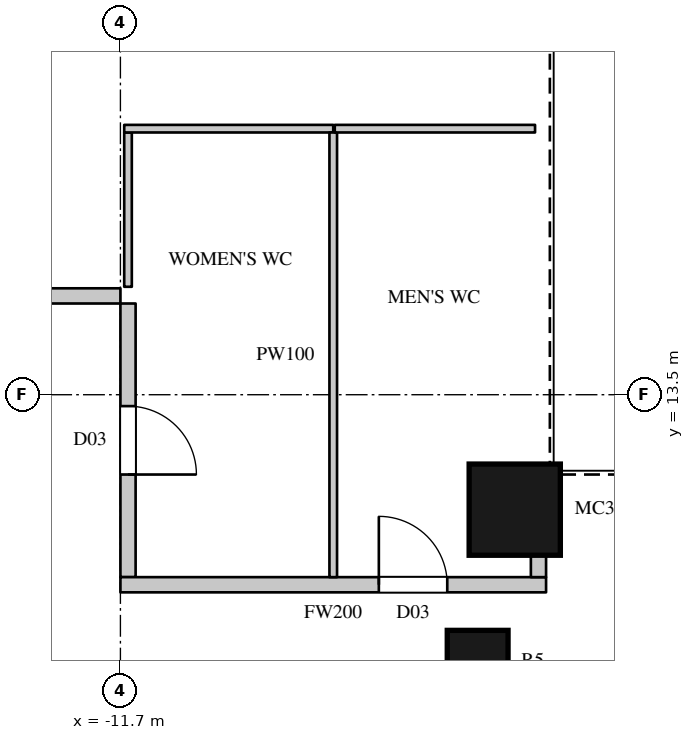
"""IFC4 building model, lengths in metres.
Left out: names, types, materials, properties, quantities, classifications, styles, units other than length and angle.
Written with IfcOpenShell. Run it as: python <this file> out.ifc"""

import sys

from ifc_helpers import new_model, si_unit, direction, frame, frame_2d, origin, origin_2d, place, context, subcontext, project, spatial, rectangle, circle, extrude, element, fill, save


model = new_model("IFC4")
c1 = context("Model", 3, precision=1e-05, world=origin(), true_north=direction((0.0, 1.0)))
c2 = subcontext(c1, "Body", "Model", "MODEL_VIEW")
j1 = project(units=[si_unit("LENGTHUNIT", "METRE"), si_unit("PLANEANGLEUNIT", "RADIAN")], contexts=[c1])
p1 = place(None, origin())
s1 = spatial("IfcSite", under=j1, at=p1, CompositionType="ELEMENT")
p2 = place(p1, origin())
s2 = spatial("IfcBuilding", under=s1, at=p2, CompositionType="ELEMENT")
p3 = place(p2, frame((0.0, 0.0, 329.5)))
s3 = spatial("IfcBuildingStorey", under=s2, at=p3, CompositionType="ELEMENT", Elevation=329.5)
p4 = place(p3, frame((-6.512, 11.988, 0.0), z_axis=(0.0, 0.0, 1.0), x_axis=(1.0, 0.0, 0.0)))
e1 = element("IfcColumn", 1, at=p4, inside=s3, PredefinedType="COLUMN", context=c2, shape_type="SweptSolid", body=[
    extrude(circle(Radius=0.6, at=origin_2d()), origin(), (0.0, 0.0, 1.0), 5.5),
])
p5 = place(p3, frame((-7.0, 10.0, 0.0), z_axis=(0.0, 0.0, 1.0), x_axis=(1.0, 0.0, 0.0)))
e2 = element("IfcColumn", 2, at=p5, inside=s3, PredefinedType="COLUMN", context=c2, shape_type="SweptSolid", body=[
    extrude(circle(Radius=0.4, at=origin_2d()), origin(), (0.0, 0.0, 1.0), 5.5),
])
p6 = place(p3, frame((-13.97, 14.8, 0.0), z_axis=(0.0, 0.0, 1.0), x_axis=(1.0, 0.0, 0.0)))
e3 = element("IfcWall", 3, at=p6, inside=s3, PredefinedType="PARTITIONING", context=c2, shape_type="SweptSolid", body=[
    extrude(rectangle(XDim=2.27, YDim=0.2, at=frame_2d((1.135, 0.0))), origin(), (0.0, 0.0, 1.0), 5.098),
])
p7 = place(p3, frame((-11.6, 11.1, 0.0), z_axis=(0.0, 0.0, 1.0), x_axis=(0.0, 1.0, 0.0)))
e4 = element("IfcWall", 4, at=p7, inside=s3, PredefinedType="PARTITIONING", context=c2, shape_type="SweptSolid", body=[
    extrude(rectangle(XDim=3.6, YDim=0.2, at=frame_2d((1.8, 0.0))), origin(), (0.0, 0.0, 1.0), 5.098),
])
p8 = place(p7, frame((1.35, 0.0, 0.0)))
e5 = element("IfcOpeningElement", 5, at=p8, cuts=e4, PredefinedType="OPENING", context=c2, shape_type="SweptSolid", body=[
    extrude(rectangle(XDim=0.9, YDim=2.2, at=frame_2d((0.45, 1.1))), frame((0.0, 0.11, 0.0), z_axis=(0.0, -1.0, 0.0), x_axis=(1.0, 0.0, 0.0)), (0.0, 0.0, 1.0), 0.22),
])
p9 = place(p3, frame((-11.7, 11.0, 0.0), z_axis=(0.0, 0.0, 1.0), x_axis=(1.0, 0.0, 0.0)))
e6 = element("IfcWall", 6, at=p9, inside=s3, PredefinedType="PARTITIONING", context=c2, shape_type="SweptSolid", body=[
    extrude(rectangle(XDim=5.6, YDim=0.2, at=frame_2d((2.8, 0.0))), origin(), (0.0, 0.0, 1.0), 5.098),
])
p10 = place(p9, frame((3.4, 0.0, 0.0)))
e7 = element("IfcOpeningElement", 7, at=p10, cuts=e6, PredefinedType="OPENING", context=c2, shape_type="SweptSolid", body=[
    extrude(rectangle(XDim=0.9, YDim=2.2, at=frame_2d((0.45, 1.1))), frame((0.0, 0.11, 0.0), z_axis=(0.0, -1.0, 0.0), x_axis=(1.0, 0.0, 0.0)), (0.0, 0.0, 1.0), 0.22),
])
p11 = place(p3, frame((-6.2, 11.1, 0.0), z_axis=(0.0, 0.0, 1.0), x_axis=(0.0, 1.0, 0.0)))
e8 = element("IfcWall", 8, at=p11, inside=s3, PredefinedType="PARTITIONING", context=c2, shape_type="SweptSolid", body=[
    extrude(rectangle(XDim=0.338, YDim=0.2, at=frame_2d((0.169, 0.0))), origin(), (0.0, 0.0, 1.0), 5.098),
])
p12 = place(p3, frame((-11.6, 14.92, 0.0), z_axis=(0.0, 0.0, 1.0), x_axis=(0.0, 1.0, 0.0)))
e9 = element("IfcWall", 9, at=p12, inside=s3, PredefinedType="PARTITIONING", context=c2, shape_type="SweptSolid", body=[
    extrude(rectangle(XDim=2.03, YDim=0.1, at=frame_2d((1.015, 0.0))), origin(), (0.0, 0.0, 1.0), 5.098),
])
p13 = place(p3, frame((-11.65, 17.0, 0.0), z_axis=(0.0, 0.0, 1.0), x_axis=(1.0, 0.0, 0.0)))
e10 = element("IfcWall", 10, at=p13, inside=s3, PredefinedType="PARTITIONING", context=c2, shape_type="SweptSolid", body=[
    extrude(rectangle(XDim=2.75, YDim=0.1, at=frame_2d((1.375, 0.0))), origin(), (0.0, 0.0, 1.0), 5.098),
])
p14 = place(p3, frame((-8.9, 11.1, 0.0), z_axis=(0.0, 0.0, 1.0), x_axis=(0.0, 1.0, 0.0)))
e11 = element("IfcWall", 11, at=p14, inside=s3, PredefinedType="PARTITIONING", context=c2, shape_type="SweptSolid", body=[
    extrude(rectangle(XDim=5.85, YDim=0.1, at=frame_2d((2.925, 0.0))), origin(), (0.0, 0.0, 1.0), 5.098),
])
p15 = place(p3, frame((-8.88, 17.0, 0.0), z_axis=(0.0, 0.0, 1.0), x_axis=(1.0, 0.0, 0.0)))
e12 = element("IfcWall", 12, at=p15, inside=s3, PredefinedType="PARTITIONING", context=c2, shape_type="SweptSolid", body=[
    extrude(rectangle(XDim=2.635, YDim=0.1, at=frame_2d((1.317, 0.0))), origin(), (0.0, 0.0, 1.0), 5.098),
])
p16 = place(p8, origin())
e13 = element("IfcDoor", 13, at=p16, inside=s3, OperationType="SINGLE_SWING_RIGHT", PredefinedType="DOOR", context=c2, shape_type="SweptSolid", body=[
    extrude(rectangle(XDim=0.9, YDim=2.2, at=frame_2d((0.45, 1.1))), frame((0.0, 0.025, 0.0), z_axis=(0.0, -1.0, 0.0), x_axis=(1.0, 0.0, 0.0)), (0.0, 0.0, 1.0), 0.05),
])
fill(e5, e13)
p17 = place(p10, origin())
e14 = element("IfcDoor", 14, at=p17, inside=s3, OperationType="SINGLE_SWING_LEFT", PredefinedType="DOOR", context=c2, shape_type="SweptSolid", body=[
    extrude(rectangle(XDim=0.9, YDim=2.2, at=frame_2d((0.45, 1.1))), frame((0.0, 0.025, 0.0), z_axis=(0.0, -1.0, 0.0), x_axis=(1.0, 0.0, 0.0)), (0.0, 0.0, 1.0), 0.05),
])
fill(e7, e14)
save(model, sys.argv[1])
